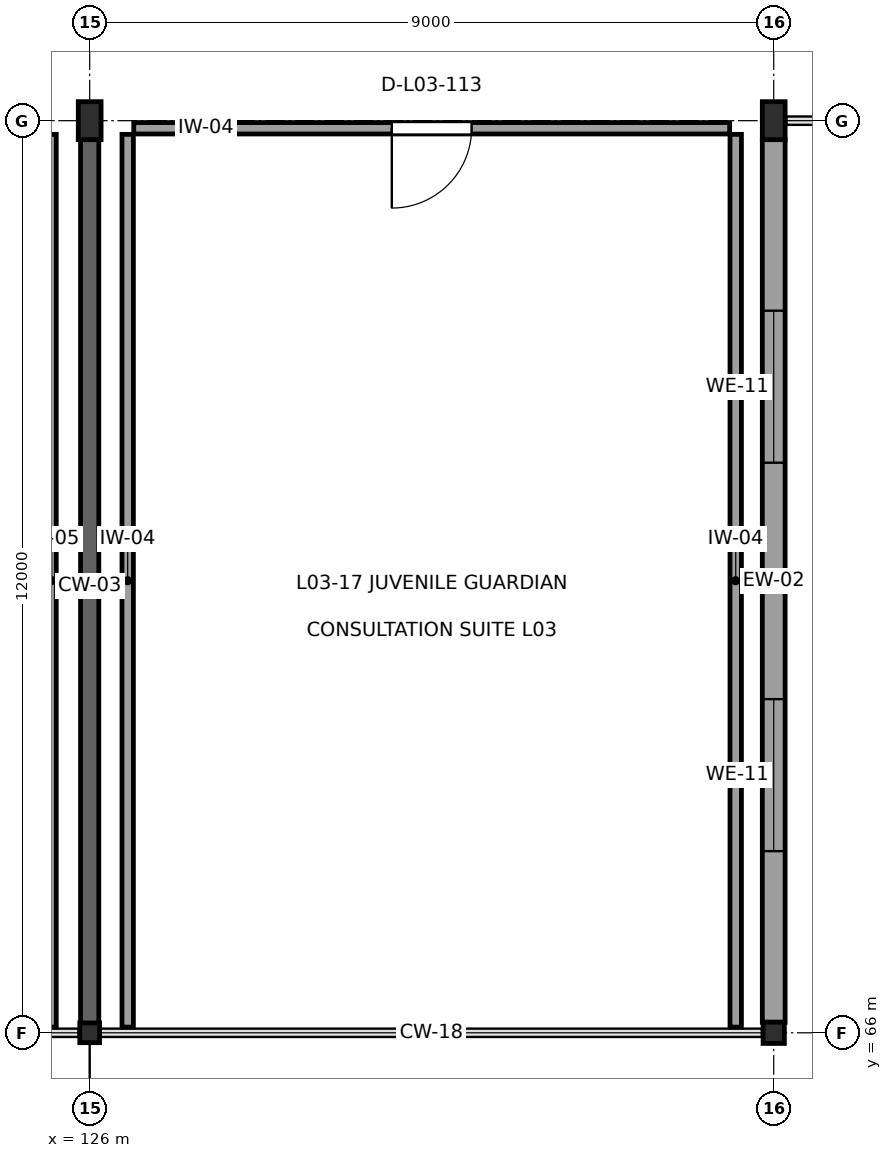
"""IFC4 building model, lengths in metres.
Left out: names, types, materials, properties, quantities, classifications, styles, units other than length and angle.
Written with IfcOpenShell. Run it as: python <this file> out.ifc"""

import sys

from ifc_helpers import new_model, si_unit, direction, frame, frame_2d, origin, origin_2d, place, context, subcontext, project, spatial, rectangle, i_section, extrude, element, fill, save


model = new_model("IFC4")
c1 = context("Model", 3, precision=1e-05, world=origin(), true_north=direction((0.0, 1.0)))
c2 = subcontext(c1, "Body", "Model", "MODEL_VIEW")
j1 = project(units=[si_unit("LENGTHUNIT", "METRE"), si_unit("PLANEANGLEUNIT", "RADIAN")], contexts=[c1])
p1 = place(None, origin())
s1 = spatial("IfcSite", under=j1, at=p1, CompositionType="ELEMENT")
p2 = place(p1, origin())
s2 = spatial("IfcBuilding", under=s1, at=p2, CompositionType="ELEMENT")
p3 = place(p2, frame((0.0, 0.0, 14.4)))
s3 = spatial("IfcBuildingStorey", under=s2, at=p3, CompositionType="ELEMENT", Elevation=14.4)
p4 = place(p3, frame((126.0, 66.0, 0.0), z_axis=(0.0, 0.0, 1.0), x_axis=(0.0, 1.0, 0.0)))
e1 = element("IfcColumn", 1, at=p4, inside=s3, PredefinedType="COLUMN", context=c2, shape_type="SweptSolid", body=[
    extrude(i_section(OverallWidth=0.26, OverallDepth=0.26, WebThickness=0.01, FlangeThickness=0.018, at=origin_2d()), origin(), (0.0, 0.0, 1.0), 4.5),
])
p5 = place(p3, frame((126.0, 78.0, 0.0), z_axis=(0.0, 0.0, 1.0), x_axis=(1.0, 0.0, 0.0)))
e2 = element("IfcColumn", 2, at=p5, inside=s3, PredefinedType="COLUMN", context=c2, shape_type="SweptSolid", body=[
    extrude(i_section(OverallWidth=0.3, OverallDepth=0.5, WebThickness=0.014, FlangeThickness=0.028, at=origin_2d()), origin(), (0.0, 0.0, 1.0), 4.5),
])
p6 = place(p3, frame((135.0, 66.0, 0.0), z_axis=(0.0, 0.0, 1.0), x_axis=(1.0, 0.0, 0.0)))
e3 = element("IfcColumn", 3, at=p6, inside=s3, PredefinedType="COLUMN", context=c2, shape_type="SweptSolid", body=[
    extrude(i_section(OverallWidth=0.28, OverallDepth=0.28, WebThickness=0.01, FlangeThickness=0.018, at=origin_2d()), origin(), (0.0, 0.0, 1.0), 4.5),
])
p7 = place(p3, frame((135.0, 78.0, 0.0), z_axis=(0.0, 0.0, 1.0), x_axis=(1.0, 0.0, 0.0)))
e4 = element("IfcColumn", 4, at=p7, inside=s3, PredefinedType="COLUMN", context=c2, shape_type="SweptSolid", body=[
    extrude(i_section(OverallWidth=0.3, OverallDepth=0.5, WebThickness=0.014, FlangeThickness=0.028, at=origin_2d()), origin(), (0.0, 0.0, 1.0), 4.5),
])
p8 = place(p3, frame((135.0, 66.138, 0.0), z_axis=(0.0, 0.0, 1.0), x_axis=(0.0, 1.0, 0.0)))
e5 = element("IfcWall", 5, at=p8, inside=s3, PredefinedType="SOLIDWALL", context=c2, shape_type="SweptSolid", body=[
    extrude(rectangle(XDim=11.614, YDim=0.3, at=frame_2d((5.807, 0.0))), origin(), (0.0, 0.0, 1.0), 3.805),
])
p9 = place(p8, frame((2.252, 0.0, 0.85)))
e6 = element("IfcOpeningElement", 6, at=p9, cuts=e5, PredefinedType="OPENING", context=c2, shape_type="SweptSolid", body=[
    extrude(rectangle(XDim=2.0, YDim=2.0, at=frame_2d((1.0, 1.0))), frame((0.0, 0.165, 0.0), z_axis=(0.0, -1.0, 0.0), x_axis=(1.0, 0.0, 0.0)), (0.0, 0.0, 1.0), 0.33),
])
p10 = place(p8, frame((7.362, 0.0, 0.85)))
e7 = element("IfcOpeningElement", 7, at=p10, cuts=e5, PredefinedType="OPENING", context=c2, shape_type="SweptSolid", body=[
    extrude(rectangle(XDim=2.0, YDim=2.0, at=frame_2d((1.0, 1.0))), frame((0.0, 0.165, 0.0), z_axis=(0.0, -1.0, 0.0), x_axis=(1.0, 0.0, 0.0)), (0.0, 0.0, 1.0), 0.33),
])
p11 = place(p3, frame((126.0, 66.008, 0.0), z_axis=(0.0, 0.0, 1.0), x_axis=(0.0, 1.0, 0.0)))
e8 = element("IfcWall", 8, at=p11, inside=s3, PredefinedType="SHEAR", context=c2, shape_type="SweptSolid", body=[
    extrude(rectangle(XDim=11.744, YDim=0.24, at=frame_2d((5.872, 0.0))), origin(), (0.0, 0.0, 1.0), 3.845),
])
p12 = place(p3, frame((125.5, 77.82, 0.0), z_axis=(0.0, 0.0, 1.0), x_axis=(0.0, -1.0, 0.0)))
e9 = element("IfcWall", 9, at=p12, inside=s3, PredefinedType="PARTITIONING", context=c2, shape_type="SweptSolid", body=[
    extrude(rectangle(XDim=11.745, YDim=0.12, at=frame_2d((5.873, 0.0))), origin(), (0.0, 0.0, 1.0), 4.14),
])
p13 = place(p3, frame((126.5, 66.075, 0.0), z_axis=(0.0, 0.0, 1.0), x_axis=(0.0, 1.0, 0.0)))
e10 = element("IfcWall", 10, at=p13, inside=s3, PredefinedType="PARTITIONING", context=c2, shape_type="SweptSolid", body=[
    extrude(rectangle(XDim=11.745, YDim=0.15, at=frame_2d((5.873, 0.0))), origin(), (0.0, 0.0, 1.0), 4.14),
])
p14 = place(p3, frame((126.58, 77.9, 0.0), z_axis=(0.0, 0.0, 1.0), x_axis=(1.0, 0.0, 0.0)))
e11 = element("IfcWall", 11, at=p14, inside=s3, PredefinedType="PARTITIONING", context=c2, shape_type="SweptSolid", body=[
    extrude(rectangle(XDim=7.84, YDim=0.15, at=frame_2d((3.92, 0.0))), origin(), (0.0, 0.0, 1.0), 3.655),
])
p15 = place(p14, frame((3.395, 0.0, 0.0)))
e12 = element("IfcOpeningElement", 12, at=p15, cuts=e11, PredefinedType="OPENING", context=c2, shape_type="SweptSolid", body=[
    extrude(rectangle(XDim=1.05, YDim=2.25, at=frame_2d((0.525, 1.125))), frame((0.0, 0.09, 0.0), z_axis=(0.0, -1.0, 0.0), x_axis=(1.0, 0.0, 0.0)), (0.0, 0.0, 1.0), 0.18),
])
p16 = place(p3, frame((134.5, 77.82, 0.0), z_axis=(0.0, 0.0, 1.0), x_axis=(0.0, -1.0, 0.0)))
e13 = element("IfcWall", 13, at=p16, inside=s3, PredefinedType="PARTITIONING", context=c2, shape_type="SweptSolid", body=[
    extrude(rectangle(XDim=11.745, YDim=0.15, at=frame_2d((5.873, 0.0))), origin(), (0.0, 0.0, 1.0), 4.14),
])
p17 = place(p9, origin())
e14 = element("IfcWindow", 14, at=p17, inside=s3, PartitioningType="SINGLE_PANEL", PredefinedType="WINDOW", context=c2, shape_type="SweptSolid", body=[
    extrude(rectangle(XDim=2.0, YDim=2.0, at=frame_2d((1.0, 1.0))), frame((0.0, 0.03, 0.0), z_axis=(0.0, -1.0, 0.0), x_axis=(1.0, 0.0, 0.0)), (0.0, 0.0, 1.0), 0.06),
])
fill(e6, e14)
p18 = place(p10, origin())
e15 = element("IfcWindow", 15, at=p18, inside=s3, PartitioningType="SINGLE_PANEL", PredefinedType="WINDOW", context=c2, shape_type="SweptSolid", body=[
    extrude(rectangle(XDim=2.0, YDim=2.0, at=frame_2d((1.0, 1.0))), frame((0.0, 0.03, 0.0), z_axis=(0.0, -1.0, 0.0), x_axis=(1.0, 0.0, 0.0)), (0.0, 0.0, 1.0), 0.06),
])
fill(e7, e15)
p19 = place(p15, frame((1.05, 0.0, 0.0), z_axis=(0.0, 0.0, 1.0), x_axis=(-1.0, 0.0, 0.0)))
e16 = element("IfcDoor", 16, at=p19, inside=s3, OperationType="SINGLE_SWING_LEFT", PredefinedType="DOOR", context=c2, shape_type="SweptSolid", body=[
    extrude(rectangle(XDim=1.05, YDim=2.25, at=frame_2d((0.525, 1.125))), frame((0.0, 0.025, 0.0), z_axis=(0.0, -1.0, 0.0), x_axis=(1.0, 0.0, 0.0)), (0.0, 0.0, 1.0), 0.05),
])
fill(e12, e16)
save(model, sys.argv[1])
